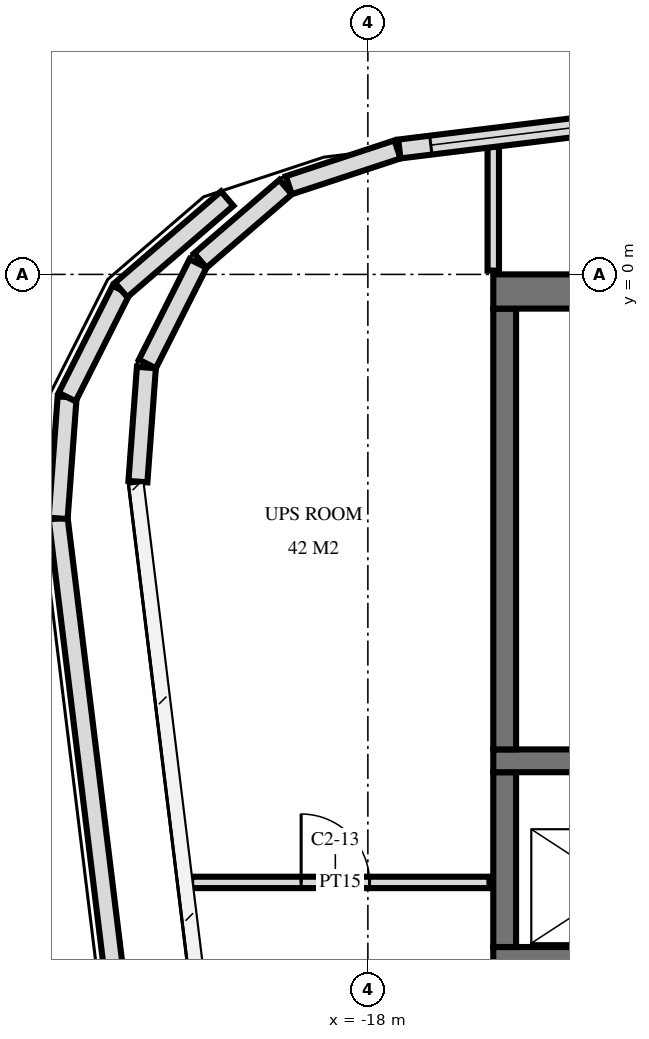
"""IFC4 building model, lengths in metres.
Left out: names, types, materials, properties, quantities, classifications, styles, units other than length and angle.
Written with IfcOpenShell. Run it as: python <this file> out.ifc"""

import sys

from ifc_helpers import new_model, si_unit, direction, frame, frame_2d, origin, place, context, subcontext, project, spatial, rectangle, extrude, element, fill, save


model = new_model("IFC4")
c1 = context("Model", 3, precision=1e-05, world=origin(), true_north=direction((0.0, 1.0)))
c2 = subcontext(c1, "Body", "Model", "MODEL_VIEW")
j1 = project(units=[si_unit("LENGTHUNIT", "METRE"), si_unit("PLANEANGLEUNIT", "RADIAN")], contexts=[c1])
p1 = place(None, origin())
s1 = spatial("IfcSite", under=j1, at=p1, CompositionType="ELEMENT")
p2 = place(p1, origin())
s2 = spatial("IfcBuilding", under=s1, at=p2, CompositionType="ELEMENT")
p3 = place(p2, frame((0.0, 0.0, 350.2)))
s3 = spatial("IfcBuildingStorey", under=s2, at=p3, CompositionType="ELEMENT", Elevation=350.2)
p4 = place(p3, frame((-16.35, -0.225, 0.0), z_axis=(0.0, 0.0, 1.0), x_axis=(1.0, 0.0, 0.0)))
e1 = element("IfcWall", 1, at=p4, inside=s3, PredefinedType="SHEAR", context=c2, shape_type="SweptSolid", body=[
    extrude(rectangle(XDim=6.35, YDim=0.45, at=frame_2d((3.175, 0.0))), origin(), (0.0, 0.0, 1.0), 3.6),
])
p5 = place(p3, frame((-16.2, -6.25, 0.0), z_axis=(0.0, 0.0, 1.0), x_axis=(0.0, 1.0, 0.0)))
e2 = element("IfcWall", 2, at=p5, inside=s3, PredefinedType="SHEAR", context=c2, shape_type="SweptSolid", body=[
    extrude(rectangle(XDim=5.8, YDim=0.3, at=frame_2d((2.9, 0.0))), origin(), (0.0, 0.0, 1.0), 3.6),
])
p6 = place(p3, frame((-16.35, -9.0, 0.0), z_axis=(0.0, 0.0, 1.0), x_axis=(1.0, 0.0, 0.0)))
e3 = element("IfcWall", 3, at=p6, inside=s3, PredefinedType="SHEAR", context=c2, shape_type="SweptSolid", body=[
    extrude(rectangle(XDim=6.0, YDim=0.3, at=frame_2d((3.0, 0.0))), origin(), (0.0, 0.0, 1.0), 3.6),
])
p7 = place(p6, frame((1.1, 0.0, 0.0)))
e4 = element("IfcOpeningElement", 4, at=p7, cuts=e3, PredefinedType="OPENING", context=c2, shape_type="SweptSolid", body=[
    extrude(rectangle(XDim=1.1, YDim=2.1, at=frame_2d((0.55, 1.05))), frame((0.0, 0.16, 0.0), z_axis=(0.0, -1.0, 0.0), x_axis=(1.0, 0.0, 0.0)), (0.0, 0.0, 1.0), 0.32),
])
p8 = place(p3, frame((-16.35, -6.4, 0.0), z_axis=(0.0, 0.0, 1.0), x_axis=(1.0, 0.0, 0.0)))
e5 = element("IfcWall", 5, at=p8, inside=s3, PredefinedType="SHEAR", context=c2, shape_type="SweptSolid", body=[
    extrude(rectangle(XDim=3.3, YDim=0.3, at=frame_2d((1.65, 0.0))), origin(), (0.0, 0.0, 1.0), 3.6),
])
p9 = place(p3, frame((-16.2, -8.85, 0.0), z_axis=(0.0, 0.0, 1.0), x_axis=(0.0, 1.0, 0.0)))
e6 = element("IfcWall", 6, at=p9, inside=s3, PredefinedType="SHEAR", context=c2, shape_type="SweptSolid", body=[
    extrude(rectangle(XDim=2.3, YDim=0.3, at=frame_2d((1.15, 0.0))), origin(), (0.0, 0.0, 1.0), 3.6),
])
p10 = place(p3, frame((14.524, 5.593, 0.0), z_axis=(0.0, 0.0, 1.0), x_axis=(-0.992546946727, -0.121862867777, 0.0)))
e7 = element("IfcWall", 7, at=p10, inside=s3, PredefinedType="SOLIDWALL", context=c2, shape_type="SweptSolid", body=[
    extrude(rectangle(XDim=32.351, YDim=0.25, at=frame_2d((16.176, 0.0))), origin(), (0.0, 0.0, 1.0), 3.32),
])
p11 = place(p10, frame((0.417, 0.0, 0.498)))
e8 = element("IfcOpeningElement", 8, at=p11, cuts=e7, PredefinedType="OPENING", context=c2, shape_type="SweptSolid", body=[
    extrude(rectangle(XDim=2.4, YDim=2.622, at=frame_2d((1.2, 1.311))), frame((0.0, 0.135, 0.0), z_axis=(0.0, -1.0, 0.0), x_axis=(1.0, 0.0, 0.0)), (0.0, 0.0, 1.0), 0.27),
])
p12 = place(p10, frame((3.653, 0.0, 0.498)))
e9 = element("IfcOpeningElement", 9, at=p12, cuts=e7, PredefinedType="OPENING", context=c2, shape_type="SweptSolid", body=[
    extrude(rectangle(XDim=2.4, YDim=2.622, at=frame_2d((1.2, 1.311))), frame((0.0, 0.135, 0.0), z_axis=(0.0, -1.0, 0.0), x_axis=(1.0, 0.0, 0.0)), (0.0, 0.0, 1.0), 0.27),
])
p13 = place(p10, frame((6.888, 0.0, 0.498)))
e10 = element("IfcOpeningElement", 10, at=p13, cuts=e7, PredefinedType="OPENING", context=c2, shape_type="SweptSolid", body=[
    extrude(rectangle(XDim=2.4, YDim=2.622, at=frame_2d((1.2, 1.311))), frame((0.0, 0.135, 0.0), z_axis=(0.0, -1.0, 0.0), x_axis=(1.0, 0.0, 0.0)), (0.0, 0.0, 1.0), 0.27),
])
p14 = place(p10, frame((10.123, 0.0, 0.498)))
e11 = element("IfcOpeningElement", 11, at=p14, cuts=e7, PredefinedType="OPENING", context=c2, shape_type="SweptSolid", body=[
    extrude(rectangle(XDim=2.4, YDim=2.622, at=frame_2d((1.2, 1.311))), frame((0.0, 0.135, 0.0), z_axis=(0.0, -1.0, 0.0), x_axis=(1.0, 0.0, 0.0)), (0.0, 0.0, 1.0), 0.27),
])
p15 = place(p10, frame((13.358, 0.0, 0.498)))
e12 = element("IfcOpeningElement", 12, at=p15, cuts=e7, PredefinedType="OPENING", context=c2, shape_type="SweptSolid", body=[
    extrude(rectangle(XDim=2.4, YDim=2.622, at=frame_2d((1.2, 1.311))), frame((0.0, 0.135, 0.0), z_axis=(0.0, -1.0, 0.0), x_axis=(1.0, 0.0, 0.0)), (0.0, 0.0, 1.0), 0.27),
])
p16 = place(p10, frame((16.593, 0.0, 0.498)))
e13 = element("IfcOpeningElement", 13, at=p16, cuts=e7, PredefinedType="OPENING", context=c2, shape_type="SweptSolid", body=[
    extrude(rectangle(XDim=2.4, YDim=2.622, at=frame_2d((1.2, 1.311))), frame((0.0, 0.135, 0.0), z_axis=(0.0, -1.0, 0.0), x_axis=(1.0, 0.0, 0.0)), (0.0, 0.0, 1.0), 0.27),
])
p17 = place(p10, frame((19.828, 0.0, 0.498)))
e14 = element("IfcOpeningElement", 14, at=p17, cuts=e7, PredefinedType="OPENING", context=c2, shape_type="SweptSolid", body=[
    extrude(rectangle(XDim=2.4, YDim=2.622, at=frame_2d((1.2, 1.311))), frame((0.0, 0.135, 0.0), z_axis=(0.0, -1.0, 0.0), x_axis=(1.0, 0.0, 0.0)), (0.0, 0.0, 1.0), 0.27),
])
p18 = place(p10, frame((23.063, 0.0, 0.498)))
e15 = element("IfcOpeningElement", 15, at=p18, cuts=e7, PredefinedType="OPENING", context=c2, shape_type="SweptSolid", body=[
    extrude(rectangle(XDim=2.4, YDim=2.622, at=frame_2d((1.2, 1.311))), frame((0.0, 0.135, 0.0), z_axis=(0.0, -1.0, 0.0), x_axis=(1.0, 0.0, 0.0)), (0.0, 0.0, 1.0), 0.27),
])
p19 = place(p10, frame((26.298, 0.0, 0.498)))
e16 = element("IfcOpeningElement", 16, at=p19, cuts=e7, PredefinedType="OPENING", context=c2, shape_type="SweptSolid", body=[
    extrude(rectangle(XDim=2.4, YDim=2.622, at=frame_2d((1.2, 1.311))), frame((0.0, 0.135, 0.0), z_axis=(0.0, -1.0, 0.0), x_axis=(1.0, 0.0, 0.0)), (0.0, 0.0, 1.0), 0.27),
])
p20 = place(p10, frame((29.533, 0.0, 0.498)))
e17 = element("IfcOpeningElement", 17, at=p20, cuts=e7, PredefinedType="OPENING", context=c2, shape_type="SweptSolid", body=[
    extrude(rectangle(XDim=2.4, YDim=2.622, at=frame_2d((1.2, 1.311))), frame((0.0, 0.135, 0.0), z_axis=(0.0, -1.0, 0.0), x_axis=(1.0, 0.0, 0.0)), (0.0, 0.0, 1.0), 0.27),
])
p21 = place(p3, frame((-17.61, 1.645, 0.0), z_axis=(0.0, 0.0, 1.0), x_axis=(-0.949667726079, -0.313259014305, 0.0)))
e18 = element("IfcWall", 18, at=p21, inside=s3, PredefinedType="SOLIDWALL", context=c2, shape_type="SweptSolid", body=[
    extrude(rectangle(XDim=1.506, YDim=0.25, at=frame_2d((0.753, 0.0))), origin(), (0.0, 0.0, 1.0), 3.32),
])
for number, where, z_axis, x_axis in (
    (19, (-19.083, 1.149, 0.0), (0.0, 0.0, 1.0), (-0.758, -0.653, 0.0)),
    (20, (-20.234, 0.144, 0.0), (0.0, 0.0, 1.0), (-0.45, -0.893, 0.0)),
):
    element("IfcWall", number, at=place(p3, frame(where, z_axis=z_axis, x_axis=x_axis)), inside=s3, PredefinedType="SOLIDWALL", context=c2, shape_type="SweptSolid", body=[
        extrude(rectangle(XDim=1.481, YDim=0.25, at=frame_2d((0.74, 0.0))), origin(), (0.0, 0.0, 1.0), 3.32),
    ])
p22 = place(p3, frame((-20.914, -1.225, 0.0), z_axis=(0.0, 0.0, 1.0), x_axis=(-0.074092647143, -0.997251362315, 0.0)))
e21 = element("IfcWall", 21, at=p22, inside=s3, PredefinedType="SOLIDWALL", context=c2, shape_type="SweptSolid", body=[
    extrude(rectangle(XDim=1.506, YDim=0.25, at=frame_2d((0.753, 0.0))), origin(), (0.0, 0.0, 1.0), 3.32),
])
p23 = place(p3, frame((-19.861, -21.246, 0.0), z_axis=(0.0, 0.0, 1.0), x_axis=(-0.121871564083, 0.992545878974, 0.0)))
e22 = element("IfcWall", 22, at=p23, inside=s3, PredefinedType="PARAPET", context=c2, shape_type="SweptSolid", body=[
    extrude(rectangle(XDim=18.172, YDim=0.25, at=frame_2d((9.086, 0.0))), origin(), (0.0, 0.0, 1.0), 1.1),
])
p24 = place(p3, frame((-22.075, -3.21, 0.0), z_axis=(0.0, 0.0, 1.0), x_axis=(0.074152691722, 0.997246899374, 0.0)))
e23 = element("IfcWall", 23, at=p24, inside=s3, PredefinedType="PARAPET", context=c2, shape_type="SweptSolid", body=[
    extrude(rectangle(XDim=1.6, YDim=0.25, at=frame_2d((0.8, 0.0))), origin(), (0.0, 0.0, 1.0), 1.1),
])
p25 = place(p3, frame((-21.957, -1.614, 0.0), z_axis=(0.0, 0.0, 1.0), x_axis=(0.450119218566, 0.892968470371, 0.0)))
e24 = element("IfcWall", 24, at=p25, inside=s3, PredefinedType="PARAPET", context=c2, shape_type="SweptSolid", body=[
    extrude(rectangle(XDim=1.578, YDim=0.25, at=frame_2d((0.789, 0.0))), origin(), (0.0, 0.0, 1.0), 1.1),
])
p26 = place(p3, frame((-21.246, -0.205, 0.0), z_axis=(0.0, 0.0, 1.0), x_axis=(0.75758852045, 0.652732436517, 0.0)))
e25 = element("IfcWall", 25, at=p26, inside=s3, PredefinedType="PARAPET", context=c2, shape_type="SweptSolid", body=[
    extrude(rectangle(XDim=1.842, YDim=0.25, at=frame_2d((0.921, 0.0))), origin(), (0.0, 0.0, 1.0), 1.1),
])
p27 = place(p3, frame((-16.35, 0.05, 0.0), z_axis=(0.0, 0.0, 1.0), x_axis=(0.0, 1.0, 0.0)))
e26 = element("IfcWall", 26, at=p27, inside=s3, PredefinedType="PARTITIONING", context=c2, shape_type="SweptSolid", body=[
    extrude(rectangle(XDim=1.636, YDim=0.15, at=frame_2d((0.818, 0.0))), origin(), (0.0, 0.0, 1.0), 3.32),
])
p28 = place(p3, frame((-20.325, -8.0, 0.0), z_axis=(0.0, 0.0, 1.0), x_axis=(1.0, 0.0, 0.0)))
e27 = element("IfcWall", 27, at=p28, inside=s3, PredefinedType="PARTITIONING", context=c2, shape_type="SweptSolid", body=[
    extrude(rectangle(XDim=3.925, YDim=0.15, at=frame_2d((1.963, 0.0))), origin(), (0.0, 0.0, 1.0), 3.32),
])
p29 = place(p28, frame((1.447, 0.0, 0.0)))
e28 = element("IfcOpeningElement", 28, at=p29, cuts=e27, PredefinedType="OPENING", context=c2, shape_type="SweptSolid", body=[
    extrude(rectangle(XDim=0.9, YDim=2.1, at=frame_2d((0.45, 1.05))), frame((0.0, 0.085, 0.0), z_axis=(0.0, -1.0, 0.0), x_axis=(1.0, 0.0, 0.0)), (0.0, 0.0, 1.0), 0.17),
])
p30 = place(p20, origin())
e29 = element("IfcWindow", 29, at=p30, inside=s3, PartitioningType="SINGLE_PANEL", PredefinedType="USERDEFINED", context=c2, shape_type="SweptSolid", body=[
    extrude(rectangle(XDim=2.4, YDim=2.622, at=frame_2d((1.2, 1.311))), frame((0.0, 0.03, 0.0), z_axis=(0.0, -1.0, 0.0), x_axis=(1.0, 0.0, 0.0)), (0.0, 0.0, 1.0), 0.06),
])
fill(e17, e29)
p31 = place(p29, origin())
e30 = element("IfcDoor", 30, at=p31, inside=s3, OperationType="SINGLE_SWING_RIGHT", PredefinedType="DOOR", context=c2, shape_type="SweptSolid", body=[
    extrude(rectangle(XDim=0.9, YDim=2.1, at=frame_2d((0.45, 1.05))), frame((0.0, 0.025, 0.0), z_axis=(0.0, -1.0, 0.0), x_axis=(1.0, 0.0, 0.0)), (0.0, 0.0, 1.0), 0.05),
])
fill(e28, e30)
save(model, sys.argv[1])
